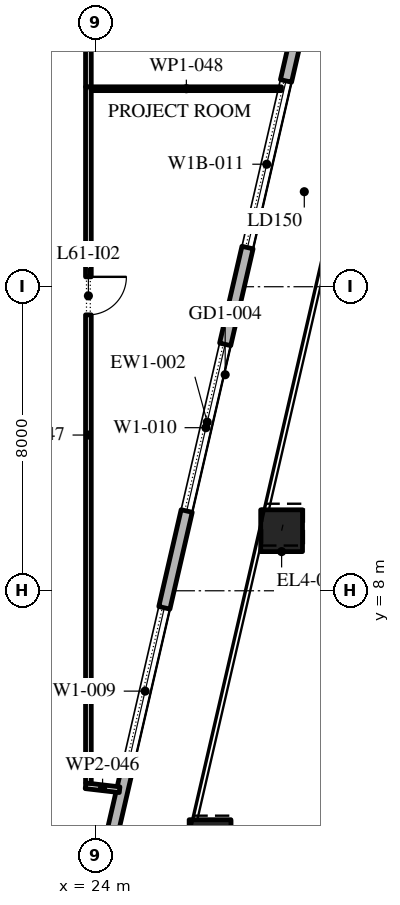
"""IFC4 building model, lengths in metres.
Left out: names, types, materials, properties, quantities, classifications, styles, units other than length and angle.
Written with IfcOpenShell. Run it as: python <this file> out.ifc"""

import sys

from ifc_helpers import new_model, si_unit, direction, frame, frame_2d, origin, origin_2d, place, context, subcontext, project, spatial, rectangle, extrude, element, fill, save


model = new_model("IFC4")
c1 = context("Model", 3, precision=1e-05, world=origin(), true_north=direction((0.0, 1.0)))
c2 = subcontext(c1, "Body", "Model", "MODEL_VIEW")
j1 = project(units=[si_unit("LENGTHUNIT", "METRE"), si_unit("PLANEANGLEUNIT", "RADIAN")], contexts=[c1])
p1 = place(None, origin())
s1 = spatial("IfcSite", under=j1, at=p1, CompositionType="ELEMENT")
p2 = place(p1, origin())
s2 = spatial("IfcBuilding", under=s1, at=p2, CompositionType="ELEMENT")
p3 = place(p2, frame((0.0, 0.0, 280.8)))
s3 = spatial("IfcBuildingStorey", under=s2, at=p3, CompositionType="ELEMENT", Elevation=280.8)
p4 = place(p3, frame((27.001, 1.426, 0.0), z_axis=(0.005869083212, 0.025335844359, 0.999661767226), x_axis=(-0.974202561131, 0.225675363932, 0.0)))
e1 = element("IfcColumn", 1, at=p4, inside=s3, PredefinedType="COLUMN", context=c2, shape_type="SweptSolid", body=[
    extrude(rectangle(XDim=1.1, YDim=1.1, at=origin_2d()), origin(), (0.0, 0.0, 1.0), 4.201),
])
p5 = place(p3, frame((28.884, 9.58, 0.0), z_axis=(0.008770865357, 0.037987721479, 0.999239713451), x_axis=(-0.97436607968, 0.224968315033, 0.0)))
e2 = element("IfcColumn", 2, at=p5, inside=s3, PredefinedType="COLUMN", context=c2, shape_type="SweptSolid", body=[
    extrude(rectangle(XDim=1.1, YDim=1.1, at=origin_2d()), origin(), (0.0, 0.0, 1.0), 4.203),
])
p6 = place(p3, frame((21.359, -11.678, 0.0), z_axis=(0.0, 0.0, 1.0), x_axis=(0.224949198343, 0.974370493275, 0.0)))
e3 = element("IfcWall", 3, at=p6, inside=s3, PredefinedType="STANDARD", context=c2, shape_type="SweptSolid", body=[
    extrude(rectangle(XDim=49.5, YDim=0.3, at=frame_2d((24.75, 0.0))), origin(), (0.0, 0.0, 1.0), 4.0),
])
p7 = place(p6, frame((1.157, 0.0, 0.45)))
e4 = element("IfcOpeningElement", 4, at=p7, cuts=e3, PredefinedType="OPENING", context=c2, shape_type="SweptSolid", body=[
    extrude(rectangle(XDim=4.5, YDim=3.05, at=frame_2d((2.25, 1.525))), frame((0.0, 0.16, 0.0), z_axis=(0.0, -1.0, 0.0), x_axis=(1.0, 0.0, 0.0)), (0.0, 0.0, 1.0), 0.32),
])
p8 = place(p6, frame((8.121, 0.0, 0.45)))
e5 = element("IfcOpeningElement", 5, at=p8, cuts=e3, PredefinedType="OPENING", context=c2, shape_type="SweptSolid", body=[
    extrude(rectangle(XDim=4.5, YDim=3.05, at=frame_2d((2.25, 1.525))), frame((0.0, 0.16, 0.0), z_axis=(0.0, -1.0, 0.0), x_axis=(1.0, 0.0, 0.0)), (0.0, 0.0, 1.0), 0.32),
])
p9 = place(p6, frame((15.236, 0.0, 0.45)))
e6 = element("IfcOpeningElement", 6, at=p9, cuts=e3, PredefinedType="OPENING", context=c2, shape_type="SweptSolid", body=[
    extrude(rectangle(XDim=4.5, YDim=3.05, at=frame_2d((2.25, 1.525))), frame((0.0, 0.16, 0.0), z_axis=(0.0, -1.0, 0.0), x_axis=(1.0, 0.0, 0.0)), (0.0, 0.0, 1.0), 0.32),
])
p10 = place(p6, frame((22.35, 0.0, 0.45)))
e7 = element("IfcOpeningElement", 7, at=p10, cuts=e3, PredefinedType="OPENING", context=c2, shape_type="SweptSolid", body=[
    extrude(rectangle(XDim=4.5, YDim=3.05, at=frame_2d((2.25, 1.525))), frame((0.0, 0.16, 0.0), z_axis=(0.0, -1.0, 0.0), x_axis=(1.0, 0.0, 0.0)), (0.0, 0.0, 1.0), 0.32),
])
p11 = place(p6, frame((29.464, 0.0, 0.45)))
e8 = element("IfcOpeningElement", 8, at=p11, cuts=e3, PredefinedType="OPENING", context=c2, shape_type="SweptSolid", body=[
    extrude(rectangle(XDim=4.5, YDim=2.95, at=frame_2d((2.25, 1.475))), frame((0.0, 0.16, 0.0), z_axis=(0.0, -1.0, 0.0), x_axis=(1.0, 0.0, 0.0)), (0.0, 0.0, 1.0), 0.32),
])
p12 = place(p6, frame((37.628, 0.0, 0.0)))
e9 = element("IfcOpeningElement", 9, at=p12, cuts=e3, PredefinedType="OPENING", context=c2, shape_type="SweptSolid", body=[
    extrude(rectangle(XDim=2.4, YDim=3.325, at=frame_2d((1.2, 1.663))), frame((0.0, 0.16, 0.0), z_axis=(0.0, -1.0, 0.0), x_axis=(1.0, 0.0, 0.0)), (0.0, 0.0, 1.0), 0.32),
])
p13 = place(p6, frame((43.693, 0.0, 0.45)))
e10 = element("IfcOpeningElement", 10, at=p13, cuts=e3, PredefinedType="OPENING", context=c2, shape_type="SweptSolid", body=[
    extrude(rectangle(XDim=4.5, YDim=2.575, at=frame_2d((2.25, 1.288))), frame((0.0, 0.16, 0.0), z_axis=(0.0, -1.0, 0.0), x_axis=(1.0, 0.0, 0.0)), (0.0, 0.0, 1.0), 0.32),
])
p14 = place(p3, frame((23.725, 2.869, 0.0), z_axis=(0.0, 0.0, 1.0), x_axis=(0.993330469257, -0.115302119865, 0.0)))
e11 = element("IfcWall", 11, at=p14, inside=s3, PredefinedType="PARTITIONING", context=c2, shape_type="SweptSolid", body=[
    extrude(rectangle(XDim=0.902, YDim=0.15, at=frame_2d((0.451, 0.0))), origin(), (0.0, 0.0, 1.0), 4.0),
])
p15 = place(p3, frame((23.8, 21.26, 0.0), z_axis=(0.0, 0.0, 1.0), x_axis=(0.0, -1.0, 0.0)))
e12 = element("IfcWall", 12, at=p15, inside=s3, PredefinedType="PARTITIONING", context=c2, shape_type="SweptSolid", body=[
    extrude(rectangle(XDim=18.325, YDim=0.15, at=frame_2d((9.163, 0.0))), origin(), (0.0, 0.0, 1.0), 4.0),
])
p16 = place(p15, frame((5.0, 0.0, 0.0)))
e13 = element("IfcOpeningElement", 13, at=p16, cuts=e12, PredefinedType="OPENING", context=c2, shape_type="SweptSolid", body=[
    extrude(rectangle(XDim=1.0, YDim=2.1, at=frame_2d((0.5, 1.05))), frame((0.0, 0.085, 0.0), z_axis=(0.0, -1.0, 0.0), x_axis=(1.0, 0.0, 0.0)), (0.0, 0.0, 1.0), 0.17),
])
p17 = place(p3, frame((23.875, 21.21, 0.0), z_axis=(0.0, 0.0, 1.0), x_axis=(1.0, 0.0, 0.0)))
e14 = element("IfcWall", 14, at=p17, inside=s3, PredefinedType="PARTITIONING", context=c2, shape_type="SweptSolid", body=[
    extrude(rectangle(XDim=5.005, YDim=0.1, at=frame_2d((2.502, 0.0))), origin(), (0.0, 0.0, 1.0), 4.0),
])
p18 = place(p3, frame((23.8, 29.71, 0.0), z_axis=(0.0, 0.0, 1.0), x_axis=(0.0, -1.0, 0.0)))
e15 = element("IfcWall", 15, at=p18, inside=s3, PredefinedType="PARTITIONING", context=c2, shape_type="SweptSolid", body=[
    extrude(rectangle(XDim=8.45, YDim=0.15, at=frame_2d((4.225, 0.0))), origin(), (0.0, 0.0, 1.0), 4.0),
])
p19 = place(p18, frame((4.6, 0.0, 0.0)))
e16 = element("IfcOpeningElement", 16, at=p19, cuts=e15, PredefinedType="OPENING", context=c2, shape_type="SweptSolid", body=[
    extrude(rectangle(XDim=1.0, YDim=2.1, at=frame_2d((0.5, 1.05))), frame((0.0, 0.085, 0.0), z_axis=(0.0, -1.0, 0.0), x_axis=(1.0, 0.0, 0.0)), (0.0, 0.0, 1.0), 0.17),
])
p20 = place(p9, origin())
e17 = element("IfcWindow", 17, at=p20, inside=s3, PartitioningType="DOUBLE_PANEL_VERTICAL", PredefinedType="WINDOW", context=c2, shape_type="SweptSolid", body=[
    extrude(rectangle(XDim=4.5, YDim=3.05, at=frame_2d((2.25, 1.525))), frame((0.0, 0.03, 0.0), z_axis=(0.0, -1.0, 0.0), x_axis=(1.0, 0.0, 0.0)), (0.0, 0.0, 1.0), 0.06),
])
fill(e6, e17)
p21 = place(p10, origin())
e18 = element("IfcWindow", 18, at=p21, inside=s3, PartitioningType="DOUBLE_PANEL_VERTICAL", PredefinedType="WINDOW", context=c2, shape_type="SweptSolid", body=[
    extrude(rectangle(XDim=4.5, YDim=3.05, at=frame_2d((2.25, 1.525))), frame((0.0, 0.03, 0.0), z_axis=(0.0, -1.0, 0.0), x_axis=(1.0, 0.0, 0.0)), (0.0, 0.0, 1.0), 0.06),
])
fill(e7, e18)
p22 = place(p11, origin())
e19 = element("IfcWindow", 19, at=p22, inside=s3, PartitioningType="DOUBLE_PANEL_VERTICAL", PredefinedType="WINDOW", context=c2, shape_type="SweptSolid", body=[
    extrude(rectangle(XDim=4.5, YDim=2.95, at=frame_2d((2.25, 1.475))), frame((0.0, 0.03, 0.0), z_axis=(0.0, -1.0, 0.0), x_axis=(1.0, 0.0, 0.0)), (0.0, 0.0, 1.0), 0.06),
])
fill(e8, e19)
p23 = place(p16, origin())
e20 = element("IfcDoor", 20, at=p23, inside=s3, OperationType="SINGLE_SWING_RIGHT", PredefinedType="DOOR", context=c2, shape_type="SweptSolid", body=[
    extrude(rectangle(XDim=1.0, YDim=2.1, at=frame_2d((0.5, 1.05))), frame((0.0, 0.025, 0.0), z_axis=(0.0, -1.0, 0.0), x_axis=(1.0, 0.0, 0.0)), (0.0, 0.0, 1.0), 0.05),
])
fill(e13, e20)
save(model, sys.argv[1])
